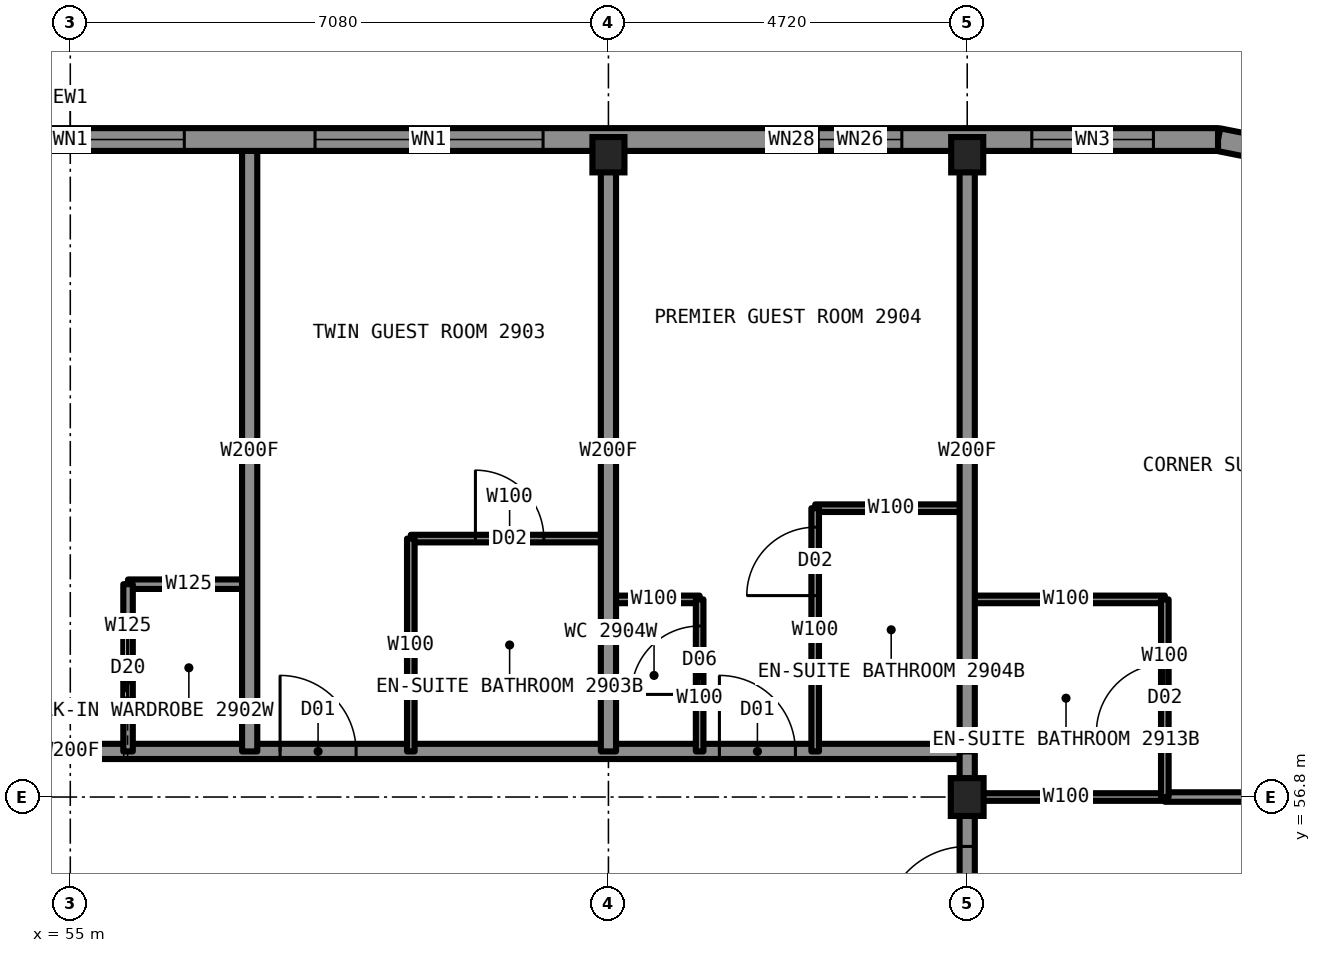
"""IFC4 building model, lengths in metres.
Left out: names, types, materials, properties, quantities, classifications, styles, units other than length and angle.
Written with IfcOpenShell. Run it as: python <this file> out.ifc"""

import sys

from ifc_helpers import new_model, si_unit, direction, frame, frame_2d, origin, origin_2d, place, context, subcontext, project, spatial, rectangle, i_section, extrude, element, fill, save


model = new_model("IFC4")
c1 = context("Model", 3, precision=1e-05, world=origin(), true_north=direction((0.0, 1.0)))
c2 = subcontext(c1, "Body", "Model", "MODEL_VIEW")
j1 = project(units=[si_unit("LENGTHUNIT", "METRE"), si_unit("PLANEANGLEUNIT", "RADIAN")], contexts=[c1])
p1 = place(None, origin())
s1 = spatial("IfcSite", under=j1, at=p1, CompositionType="ELEMENT")
p2 = place(p1, origin())
s2 = spatial("IfcBuilding", under=s1, at=p2, CompositionType="ELEMENT")
p3 = place(p2, frame((0.0, 0.0, 103.9)))
s3 = spatial("IfcBuildingStorey", under=s2, at=p3, CompositionType="ELEMENT", Elevation=103.9)
for number, where, z_axis, x_axis in (
    (1, (62.08, 65.25, 0.0), (0.0, 0.0, 1.0), (1.0, 0.0, 0.0)),
    (2, (66.8, 65.25, 0.0), (0.0, 0.0, 1.0), (1.0, 0.0, 0.0)),
):
    element("IfcColumn", number, at=place(p3, frame(where, z_axis=z_axis, x_axis=x_axis)), inside=s3, PredefinedType="COLUMN", context=c2, shape_type="SweptSolid", body=[
        extrude(i_section(OverallWidth=0.422, OverallDepth=0.465, WebThickness=0.045, FlangeThickness=0.073, at=origin_2d()), origin(), (0.0, 0.0, 1.0), 3.5),
    ])
p4 = place(p3, frame((66.8, 56.8, 0.0), z_axis=(0.0, 0.0, 1.0), x_axis=(1.0, 0.0, 0.0)))
e3 = element("IfcColumn", 3, at=p4, inside=s3, PredefinedType="COLUMN", context=c2, shape_type="SweptSolid", body=[
    extrude(i_section(OverallWidth=0.432, OverallDepth=0.498, WebThickness=0.056, FlangeThickness=0.089, at=origin_2d()), origin(), (0.0, 0.0, 1.0), 3.5),
])
p5 = place(p3, frame((66.8, 56.8, 0.0), z_axis=(0.0, 0.0, 1.0), x_axis=(1.0, 0.0, 0.0)))
e4 = element("IfcWall", 4, at=p5, inside=s3, PredefinedType="PARTITIONING", context=c2, shape_type="SweptSolid", body=[
    extrude(rectangle(XDim=2.6, YDim=0.1, at=frame_2d((1.3, 0.0))), origin(), (0.0, 0.0, 1.0), 2.573),
])
p6 = place(p3, frame((69.4, 56.8, 0.0), z_axis=(0.0, 0.0, 1.0), x_axis=(1.0, 0.0, 0.0)))
e5 = element("IfcWall", 5, at=p6, inside=s3, PredefinedType="PARTITIONING", context=c2, shape_type="SweptSolid", body=[
    extrude(rectangle(XDim=5.9, YDim=0.125, at=frame_2d((2.95, 0.0))), origin(), (0.0, 0.0, 1.0), 2.573),
])
p7 = place(p6, frame((1.15, 0.0, 0.0)))
e6 = element("IfcOpeningElement", 6, at=p7, cuts=e5, PredefinedType="OPENING", context=c2, shape_type="SweptSolid", body=[
    extrude(rectangle(XDim=0.9, YDim=2.2, at=frame_2d((0.45, 1.1))), frame((0.0, 0.073, 0.0), z_axis=(0.0, -1.0, 0.0), x_axis=(1.0, 0.0, 0.0)), (0.0, 0.0, 1.0), 0.145),
])
p8 = place(p3, frame((43.2, 57.4, 0.0), z_axis=(0.0, 0.0, 1.0), x_axis=(1.0, 0.0, 0.0)))
e7 = element("IfcWall", 7, at=p8, inside=s3, PredefinedType="PARTITIONING", context=c2, shape_type="SweptSolid", body=[
    extrude(rectangle(XDim=23.6, YDim=0.2, at=frame_2d((11.8, 0.0))), origin(), (0.0, 0.0, 1.0), 3.33),
])
p9 = place(p8, frame((2.55, 0.0, 0.0)))
e8 = element("IfcOpeningElement", 8, at=p9, cuts=e7, PredefinedType="OPENING", context=c2, shape_type="SweptSolid", body=[
    extrude(rectangle(XDim=1.0, YDim=2.2, at=frame_2d((0.5, 1.1))), frame((0.0, 0.11, 0.0), z_axis=(0.0, -1.0, 0.0), x_axis=(1.0, 0.0, 0.0)), (0.0, 0.0, 1.0), 0.22),
])
p10 = place(p8, frame((7.72, 0.0, 0.0)))
e9 = element("IfcOpeningElement", 9, at=p10, cuts=e7, PredefinedType="OPENING", context=c2, shape_type="SweptSolid", body=[
    extrude(rectangle(XDim=1.0, YDim=2.2, at=frame_2d((0.5, 1.1))), frame((0.0, 0.11, 0.0), z_axis=(0.0, -1.0, 0.0), x_axis=(1.0, 0.0, 0.0)), (0.0, 0.0, 1.0), 0.22),
])
p11 = place(p8, frame((14.56, 0.0, 0.0)))
e10 = element("IfcOpeningElement", 10, at=p11, cuts=e7, PredefinedType="OPENING", context=c2, shape_type="SweptSolid", body=[
    extrude(rectangle(XDim=1.0, YDim=2.2, at=frame_2d((0.5, 1.1))), frame((0.0, 0.11, 0.0), z_axis=(0.0, -1.0, 0.0), x_axis=(1.0, 0.0, 0.0)), (0.0, 0.0, 1.0), 0.22),
])
p12 = place(p8, frame((20.34, 0.0, 0.0)))
e11 = element("IfcOpeningElement", 11, at=p12, cuts=e7, PredefinedType="OPENING", context=c2, shape_type="SweptSolid", body=[
    extrude(rectangle(XDim=1.0, YDim=2.2, at=frame_2d((0.5, 1.1))), frame((0.0, 0.11, 0.0), z_axis=(0.0, -1.0, 0.0), x_axis=(1.0, 0.0, 0.0)), (0.0, 0.0, 1.0), 0.22),
])
p13 = place(p3, frame((62.08, 59.4, 0.0), z_axis=(0.0, 0.0, 1.0), x_axis=(1.0, 0.0, 0.0)))
e12 = element("IfcWall", 12, at=p13, inside=s3, PredefinedType="PARTITIONING", context=c2, shape_type="SweptSolid", body=[
    extrude(rectangle(XDim=1.2, YDim=0.1, at=frame_2d((0.6, 0.0))), origin(), (0.0, 0.0, 1.0), 3.33),
])
p14 = place(p3, frame((66.8, 59.4, 0.0), z_axis=(0.0, 0.0, 1.0), x_axis=(1.0, 0.0, 0.0)))
e13 = element("IfcWall", 13, at=p14, inside=s3, PredefinedType="PARTITIONING", context=c2, shape_type="SweptSolid", body=[
    extrude(rectangle(XDim=2.6, YDim=0.1, at=frame_2d((1.3, 0.0))), origin(), (0.0, 0.0, 1.0), 3.33),
])
p15 = place(p3, frame((55.76, 59.6, 0.0), z_axis=(0.0, 0.0, 1.0), x_axis=(1.0, 0.0, 0.0)))
e14 = element("IfcWall", 14, at=p15, inside=s3, PredefinedType="PARTITIONING", context=c2, shape_type="SweptSolid", body=[
    extrude(rectangle(XDim=1.6, YDim=0.125, at=frame_2d((0.8, 0.0))), origin(), (0.0, 0.0, 1.0), 3.33),
])
p16 = place(p3, frame((59.48, 60.2, 0.0), z_axis=(0.0, 0.0, 1.0), x_axis=(1.0, 0.0, 0.0)))
e15 = element("IfcWall", 15, at=p16, inside=s3, PredefinedType="PARTITIONING", context=c2, shape_type="SweptSolid", body=[
    extrude(rectangle(XDim=2.6, YDim=0.1, at=frame_2d((1.3, 0.0))), origin(), (0.0, 0.0, 1.0), 2.731),
])
p17 = place(p16, frame((0.85, 0.0, 0.0)))
e16 = element("IfcOpeningElement", 16, at=p17, cuts=e15, PredefinedType="OPENING", context=c2, shape_type="SweptSolid", body=[
    extrude(rectangle(XDim=0.9, YDim=2.1, at=frame_2d((0.45, 1.05))), frame((0.0, 0.06, 0.0), z_axis=(0.0, -1.0, 0.0), x_axis=(1.0, 0.0, 0.0)), (0.0, 0.0, 1.0), 0.12),
])
p18 = place(p3, frame((64.8, 60.6, 0.0), z_axis=(0.0, 0.0, 1.0), x_axis=(1.0, 0.0, 0.0)))
e17 = element("IfcWall", 17, at=p18, inside=s3, PredefinedType="PARTITIONING", context=c2, shape_type="SweptSolid", body=[
    extrude(rectangle(XDim=2.0, YDim=0.1, at=frame_2d((1.0, 0.0))), origin(), (0.0, 0.0, 1.0), 3.33),
])
p19 = place(p3, frame((55.76, 57.4, 0.0), z_axis=(0.0, 0.0, 1.0), x_axis=(0.0, 1.0, 0.0)))
e18 = element("IfcWall", 18, at=p19, inside=s3, PredefinedType="PARTITIONING", context=c2, shape_type="SweptSolid", body=[
    extrude(rectangle(XDim=2.2, YDim=0.125, at=frame_2d((1.1, 0.0))), origin(), (0.0, 0.0, 1.0), 3.33),
])
p20 = place(p19, frame((0.7, 0.0, 0.0)))
e19 = element("IfcOpeningElement", 19, at=p20, cuts=e18, PredefinedType="OPENING", context=c2, shape_type="SweptSolid", body=[
    extrude(rectangle(XDim=0.8, YDim=2.1, at=frame_2d((0.4, 1.05))), frame((0.0, 0.073, 0.0), z_axis=(0.0, -1.0, 0.0), x_axis=(1.0, 0.0, 0.0)), (0.0, 0.0, 1.0), 0.145),
])
p21 = place(p3, frame((66.8, 33.2, 0.0), z_axis=(0.0, 0.0, 1.0), x_axis=(0.0, 1.0, 0.0)))
e20 = element("IfcWall", 20, at=p21, inside=s3, PredefinedType="PARTITIONING", context=c2, shape_type="SweptSolid", body=[
    extrude(rectangle(XDim=23.58, YDim=0.2, at=frame_2d((11.79, 0.0))), origin(), (0.0, 0.0, 1.0), 3.33),
])
p22 = place(p21, frame((6.98, 0.0, 0.0)))
e21 = element("IfcOpeningElement", 21, at=p22, cuts=e20, PredefinedType="OPENING", context=c2, shape_type="SweptSolid", body=[
    extrude(rectangle(XDim=1.0, YDim=2.2, at=frame_2d((0.5, 1.1))), frame((0.0, 0.11, 0.0), z_axis=(0.0, -1.0, 0.0), x_axis=(1.0, 0.0, 0.0)), (0.0, 0.0, 1.0), 0.22),
])
p23 = place(p21, frame((12.59, 0.0, 0.0)))
e22 = element("IfcOpeningElement", 22, at=p23, cuts=e20, PredefinedType="OPENING", context=c2, shape_type="SweptSolid", body=[
    extrude(rectangle(XDim=1.0, YDim=2.2, at=frame_2d((0.5, 1.1))), frame((0.0, 0.11, 0.0), z_axis=(0.0, -1.0, 0.0), x_axis=(1.0, 0.0, 0.0)), (0.0, 0.0, 1.0), 0.22),
])
p24 = place(p21, frame((16.42, 0.0, 0.0)))
e23 = element("IfcOpeningElement", 23, at=p24, cuts=e20, PredefinedType="OPENING", context=c2, shape_type="SweptSolid", body=[
    extrude(rectangle(XDim=1.0, YDim=2.2, at=frame_2d((0.5, 1.1))), frame((0.0, 0.11, 0.0), z_axis=(0.0, -1.0, 0.0), x_axis=(1.0, 0.0, 0.0)), (0.0, 0.0, 1.0), 0.22),
])
p25 = place(p21, frame((21.85, 0.0, 0.0)))
e24 = element("IfcOpeningElement", 24, at=p25, cuts=e20, PredefinedType="OPENING", context=c2, shape_type="SweptSolid", body=[
    extrude(rectangle(XDim=1.1, YDim=2.2, at=frame_2d((0.55, 1.1))), frame((0.0, 0.11, 0.0), z_axis=(0.0, -1.0, 0.0), x_axis=(1.0, 0.0, 0.0)), (0.0, 0.0, 1.0), 0.22),
])
p26 = place(p21, frame((0.65, 0.0, 0.0)))
e25 = element("IfcOpeningElement", 25, at=p26, cuts=e20, PredefinedType="OPENING", context=c2, shape_type="SweptSolid", body=[
    extrude(rectangle(XDim=1.1, YDim=2.2, at=frame_2d((0.55, 1.1))), frame((0.0, 0.11, 0.0), z_axis=(0.0, -1.0, 0.0), x_axis=(1.0, 0.0, 0.0)), (0.0, 0.0, 1.0), 0.22),
])
p27 = place(p3, frame((66.8, 57.4, 0.0), z_axis=(0.0, 0.0, 1.0), x_axis=(0.0, 1.0, 0.0)))
e26 = element("IfcWall", 26, at=p27, inside=s3, PredefinedType="PARTITIONING", context=c2, shape_type="SweptSolid", body=[
    extrude(rectangle(XDim=7.9, YDim=0.2, at=frame_2d((3.95, 0.0))), origin(), (0.0, 0.0, 1.0), 2.573),
])
p28 = place(p3, frame((69.4, 56.8, 0.0), z_axis=(0.0, 0.0, 1.0), x_axis=(0.0, 1.0, 0.0)))
e27 = element("IfcWall", 27, at=p28, inside=s3, PredefinedType="PARTITIONING", context=c2, shape_type="SweptSolid", body=[
    extrude(rectangle(XDim=2.6, YDim=0.1, at=frame_2d((1.3, 0.0))), origin(), (0.0, 0.0, 1.0), 3.33),
])
p29 = place(p28, frame((0.85, 0.0, 0.0)))
e28 = element("IfcOpeningElement", 28, at=p29, cuts=e27, PredefinedType="OPENING", context=c2, shape_type="SweptSolid", body=[
    extrude(rectangle(XDim=0.9, YDim=2.1, at=frame_2d((0.45, 1.05))), frame((0.0, 0.06, 0.0), z_axis=(0.0, -1.0, 0.0), x_axis=(1.0, 0.0, 0.0)), (0.0, 0.0, 1.0), 0.12),
])
p30 = place(p3, frame((57.36, 57.4, 0.0), z_axis=(0.0, 0.0, 1.0), x_axis=(0.0, 1.0, 0.0)))
e29 = element("IfcWall", 29, at=p30, inside=s3, PredefinedType="PARTITIONING", context=c2, shape_type="SweptSolid", body=[
    extrude(rectangle(XDim=7.9, YDim=0.2, at=frame_2d((3.95, 0.0))), origin(), (0.0, 0.0, 1.0), 3.33),
])
p31 = place(p3, frame((59.48, 57.4, 0.0), z_axis=(0.0, 0.0, 1.0), x_axis=(0.0, 1.0, 0.0)))
e30 = element("IfcWall", 30, at=p31, inside=s3, PredefinedType="PARTITIONING", context=c2, shape_type="SweptSolid", body=[
    extrude(rectangle(XDim=2.8, YDim=0.1, at=frame_2d((1.4, 0.0))), origin(), (0.0, 0.0, 1.0), 3.33),
])
p32 = place(p3, frame((62.08, 57.4, 0.0), z_axis=(0.0, 0.0, 1.0), x_axis=(0.0, 1.0, 0.0)))
e31 = element("IfcWall", 31, at=p32, inside=s3, PredefinedType="PARTITIONING", context=c2, shape_type="SweptSolid", body=[
    extrude(rectangle(XDim=7.9, YDim=0.2, at=frame_2d((3.95, 0.0))), origin(), (0.0, 0.0, 1.0), 2.573),
])
p33 = place(p3, frame((63.28, 57.4, 0.0), z_axis=(0.0, 0.0, 1.0), x_axis=(0.0, 1.0, 0.0)))
e32 = element("IfcWall", 32, at=p33, inside=s3, PredefinedType="PARTITIONING", context=c2, shape_type="SweptSolid", body=[
    extrude(rectangle(XDim=2.0, YDim=0.1, at=frame_2d((1.0, 0.0))), origin(), (0.0, 0.0, 1.0), 3.33),
])
p34 = place(p33, frame((0.75, 0.0, 0.0)))
e33 = element("IfcOpeningElement", 33, at=p34, cuts=e32, PredefinedType="OPENING", context=c2, shape_type="SweptSolid", body=[
    extrude(rectangle(XDim=0.9, YDim=2.1, at=frame_2d((0.45, 1.05))), frame((0.0, 0.06, 0.0), z_axis=(0.0, -1.0, 0.0), x_axis=(1.0, 0.0, 0.0)), (0.0, 0.0, 1.0), 0.12),
])
p35 = place(p3, frame((64.8, 57.4, 0.0), z_axis=(0.0, 0.0, 1.0), x_axis=(0.0, 1.0, 0.0)))
e34 = element("IfcWall", 34, at=p35, inside=s3, PredefinedType="PARTITIONING", context=c2, shape_type="SweptSolid", body=[
    extrude(rectangle(XDim=3.2, YDim=0.1, at=frame_2d((1.6, 0.0))), origin(), (0.0, 0.0, 1.0), 3.33),
])
p36 = place(p35, frame((2.05, 0.0, 0.0)))
e35 = element("IfcOpeningElement", 35, at=p36, cuts=e34, PredefinedType="OPENING", context=c2, shape_type="SweptSolid", body=[
    extrude(rectangle(XDim=0.9, YDim=2.1, at=frame_2d((0.45, 1.05))), frame((0.0, 0.06, 0.0), z_axis=(0.0, -1.0, 0.0), x_axis=(1.0, 0.0, 0.0)), (0.0, 0.0, 1.0), 0.12),
])
p37 = place(p3, frame((72.147, 65.043, 0.0), z_axis=(0.0, 0.0, 1.0), x_axis=(-0.980787050784, 0.195081421501, 0.0)))
e36 = element("IfcWall", 36, at=p37, inside=s3, PredefinedType="SOLIDWALL", context=c2, shape_type="SweptSolid", body=[
    extrude(rectangle(XDim=2.087, YDim=0.3, at=frame_2d((1.044, 0.0))), origin(), (0.0, 0.0, 1.0), 3.33),
])
p38 = place(p37, frame((0.444, 0.0, 0.5)))
e37 = element("IfcOpeningElement", 37, at=p38, cuts=e36, PredefinedType="OPENING", context=c2, shape_type="SweptSolid", body=[
    extrude(rectangle(XDim=1.2, YDim=2.0, at=frame_2d((0.6, 1.0))), frame((0.0, 0.16, 0.0), z_axis=(0.0, -1.0, 0.0), x_axis=(1.0, 0.0, 0.0)), (0.0, 0.0, 1.0), 0.32),
])
p39 = place(p3, frame((70.1, 65.45, 0.0), z_axis=(0.0, 0.0, 1.0), x_axis=(-1.0, 0.0, 0.0)))
e38 = element("IfcWall", 38, at=p39, inside=s3, PredefinedType="SOLIDWALL", context=c2, shape_type="SweptSolid", body=[
    extrude(rectangle(XDim=30.2, YDim=0.3, at=frame_2d((15.1, 0.0))), origin(), (0.0, 0.0, 1.0), 2.83),
])
p40 = place(p39, frame((4.16, 0.0, 0.5)))
e39 = element("IfcOpeningElement", 39, at=p40, cuts=e38, PredefinedType="OPENING", context=c2, shape_type="SweptSolid", body=[
    extrude(rectangle(XDim=3.0, YDim=2.0, at=frame_2d((1.5, 1.0))), frame((0.0, 0.16, 0.0), z_axis=(0.0, -1.0, 0.0), x_axis=(1.0, 0.0, 0.0)), (0.0, 0.0, 1.0), 0.32),
])
p41 = place(p39, frame((8.88, 0.0, 0.5)))
e40 = element("IfcOpeningElement", 40, at=p41, cuts=e38, PredefinedType="OPENING", context=c2, shape_type="SweptSolid", body=[
    extrude(rectangle(XDim=3.0, YDim=2.0, at=frame_2d((1.5, 1.0))), frame((0.0, 0.16, 0.0), z_axis=(0.0, -1.0, 0.0), x_axis=(1.0, 0.0, 0.0)), (0.0, 0.0, 1.0), 0.32),
])
p42 = place(p39, frame((13.6, 0.0, 0.5)))
e41 = element("IfcOpeningElement", 41, at=p42, cuts=e38, PredefinedType="OPENING", context=c2, shape_type="SweptSolid", body=[
    extrude(rectangle(XDim=3.0, YDim=2.0, at=frame_2d((1.5, 1.0))), frame((0.0, 0.16, 0.0), z_axis=(0.0, -1.0, 0.0), x_axis=(1.0, 0.0, 0.0)), (0.0, 0.0, 1.0), 0.32),
])
p43 = place(p39, frame((18.32, 0.0, 0.5)))
e42 = element("IfcOpeningElement", 42, at=p43, cuts=e38, PredefinedType="OPENING", context=c2, shape_type="SweptSolid", body=[
    extrude(rectangle(XDim=3.0, YDim=2.0, at=frame_2d((1.5, 1.0))), frame((0.0, 0.16, 0.0), z_axis=(0.0, -1.0, 0.0), x_axis=(1.0, 0.0, 0.0)), (0.0, 0.0, 1.0), 0.32),
])
p44 = place(p39, frame((23.04, 0.0, 0.5)))
e43 = element("IfcOpeningElement", 43, at=p44, cuts=e38, PredefinedType="OPENING", context=c2, shape_type="SweptSolid", body=[
    extrude(rectangle(XDim=3.0, YDim=2.0, at=frame_2d((1.5, 1.0))), frame((0.0, 0.16, 0.0), z_axis=(0.0, -1.0, 0.0), x_axis=(1.0, 0.0, 0.0)), (0.0, 0.0, 1.0), 0.32),
])
p45 = place(p3, frame((66.8, 56.78, 0.0), z_axis=(0.0, 0.0, 1.0), x_axis=(0.0, 1.0, 0.0)))
e44 = element("IfcWall", 44, at=p45, inside=s3, PredefinedType="PARTITIONING", context=c2, shape_type="SweptSolid", body=[
    extrude(rectangle(XDim=0.62, YDim=0.2, at=frame_2d((0.31, 0.0))), origin(), (0.0, 0.0, 1.0), 2.573),
])
p46 = place(p20, origin())
e45 = element("IfcDoor", 45, at=p46, inside=s3, OperationType="SLIDING_TO_LEFT", PredefinedType="DOOR", context=c2, shape_type="SweptSolid", body=[
    extrude(rectangle(XDim=0.8, YDim=2.1, at=frame_2d((0.4, 1.05))), frame((0.0, 0.025, 0.0), z_axis=(0.0, -1.0, 0.0), x_axis=(1.0, 0.0, 0.0)), (0.0, 0.0, 1.0), 0.05),
])
fill(e19, e45)
p47 = place(p11, origin())
e46 = element("IfcDoor", 46, at=p47, inside=s3, OperationType="SINGLE_SWING_LEFT", PredefinedType="DOOR", context=c2, shape_type="SweptSolid", body=[
    extrude(rectangle(XDim=1.0, YDim=2.2, at=frame_2d((0.5, 1.1))), frame((0.0, 0.025, 0.0), z_axis=(0.0, -1.0, 0.0), x_axis=(1.0, 0.0, 0.0)), (0.0, 0.0, 1.0), 0.05),
])
fill(e10, e46)
p48 = place(p17, origin())
e47 = element("IfcDoor", 47, at=p48, inside=s3, OperationType="SINGLE_SWING_RIGHT", PredefinedType="DOOR", context=c2, shape_type="SweptSolid", body=[
    extrude(rectangle(XDim=0.9, YDim=2.1, at=frame_2d((0.45, 1.05))), frame((0.0, 0.025, 0.0), z_axis=(0.0, -1.0, 0.0), x_axis=(1.0, 0.0, 0.0)), (0.0, 0.0, 1.0), 0.05),
])
fill(e16, e47)
p49 = place(p12, origin())
e48 = element("IfcDoor", 48, at=p49, inside=s3, OperationType="SINGLE_SWING_LEFT", PredefinedType="DOOR", context=c2, shape_type="SweptSolid", body=[
    extrude(rectangle(XDim=1.0, YDim=2.2, at=frame_2d((0.5, 1.1))), frame((0.0, 0.025, 0.0), z_axis=(0.0, -1.0, 0.0), x_axis=(1.0, 0.0, 0.0)), (0.0, 0.0, 1.0), 0.05),
])
fill(e11, e48)
p50 = place(p36, origin())
e49 = element("IfcDoor", 49, at=p50, inside=s3, OperationType="SINGLE_SWING_RIGHT", PredefinedType="DOOR", context=c2, shape_type="SweptSolid", body=[
    extrude(rectangle(XDim=0.9, YDim=2.1, at=frame_2d((0.45, 1.05))), frame((0.0, 0.025, 0.0), z_axis=(0.0, -1.0, 0.0), x_axis=(1.0, 0.0, 0.0)), (0.0, 0.0, 1.0), 0.05),
])
fill(e35, e49)
p51 = place(p34, origin())
e50 = element("IfcDoor", 50, at=p51, inside=s3, OperationType="SINGLE_SWING_LEFT", PredefinedType="DOOR", context=c2, shape_type="SweptSolid", body=[
    extrude(rectangle(XDim=0.9, YDim=2.1, at=frame_2d((0.45, 1.05))), frame((0.0, 0.025, 0.0), z_axis=(0.0, -1.0, 0.0), x_axis=(1.0, 0.0, 0.0)), (0.0, 0.0, 1.0), 0.05),
])
fill(e33, e50)
p52 = place(p25, origin())
e51 = element("IfcDoor", 51, at=p52, inside=s3, OperationType="SINGLE_SWING_LEFT", PredefinedType="DOOR", context=c2, shape_type="SweptSolid", body=[
    extrude(rectangle(XDim=1.1, YDim=2.2, at=frame_2d((0.55, 1.1))), frame((0.0, 0.025, 0.0), z_axis=(0.0, -1.0, 0.0), x_axis=(1.0, 0.0, 0.0)), (0.0, 0.0, 1.0), 0.05),
])
fill(e24, e51)
p53 = place(p29, origin())
e52 = element("IfcDoor", 52, at=p53, inside=s3, OperationType="SINGLE_SWING_RIGHT", PredefinedType="DOOR", context=c2, shape_type="SweptSolid", body=[
    extrude(rectangle(XDim=0.9, YDim=2.1, at=frame_2d((0.45, 1.05))), frame((0.0, 0.025, 0.0), z_axis=(0.0, -1.0, 0.0), x_axis=(1.0, 0.0, 0.0)), (0.0, 0.0, 1.0), 0.05),
])
fill(e28, e52)
p54 = place(p40, origin())
e53 = element("IfcWindow", 53, at=p54, inside=s3, PartitioningType="SINGLE_PANEL", PredefinedType="WINDOW", context=c2, shape_type="SweptSolid", body=[
    extrude(rectangle(XDim=3.0, YDim=2.0, at=frame_2d((1.5, 1.0))), frame((0.0, 0.03, 0.0), z_axis=(0.0, -1.0, 0.0), x_axis=(1.0, 0.0, 0.0)), (0.0, 0.0, 1.0), 0.06),
])
fill(e39, e53)
p55 = place(p41, origin())
e54 = element("IfcWindow", 54, at=p55, inside=s3, PartitioningType="SINGLE_PANEL", PredefinedType="WINDOW", context=c2, shape_type="SweptSolid", body=[
    extrude(rectangle(XDim=3.0, YDim=2.0, at=frame_2d((1.5, 1.0))), frame((0.0, 0.03, 0.0), z_axis=(0.0, -1.0, 0.0), x_axis=(1.0, 0.0, 0.0)), (0.0, 0.0, 1.0), 0.06),
])
fill(e40, e54)
p56 = place(p42, origin())
e55 = element("IfcWindow", 55, at=p56, inside=s3, PartitioningType="SINGLE_PANEL", PredefinedType="WINDOW", context=c2, shape_type="SweptSolid", body=[
    extrude(rectangle(XDim=3.0, YDim=2.0, at=frame_2d((1.5, 1.0))), frame((0.0, 0.03, 0.0), z_axis=(0.0, -1.0, 0.0), x_axis=(1.0, 0.0, 0.0)), (0.0, 0.0, 1.0), 0.06),
])
fill(e41, e55)
save(model, sys.argv[1])
